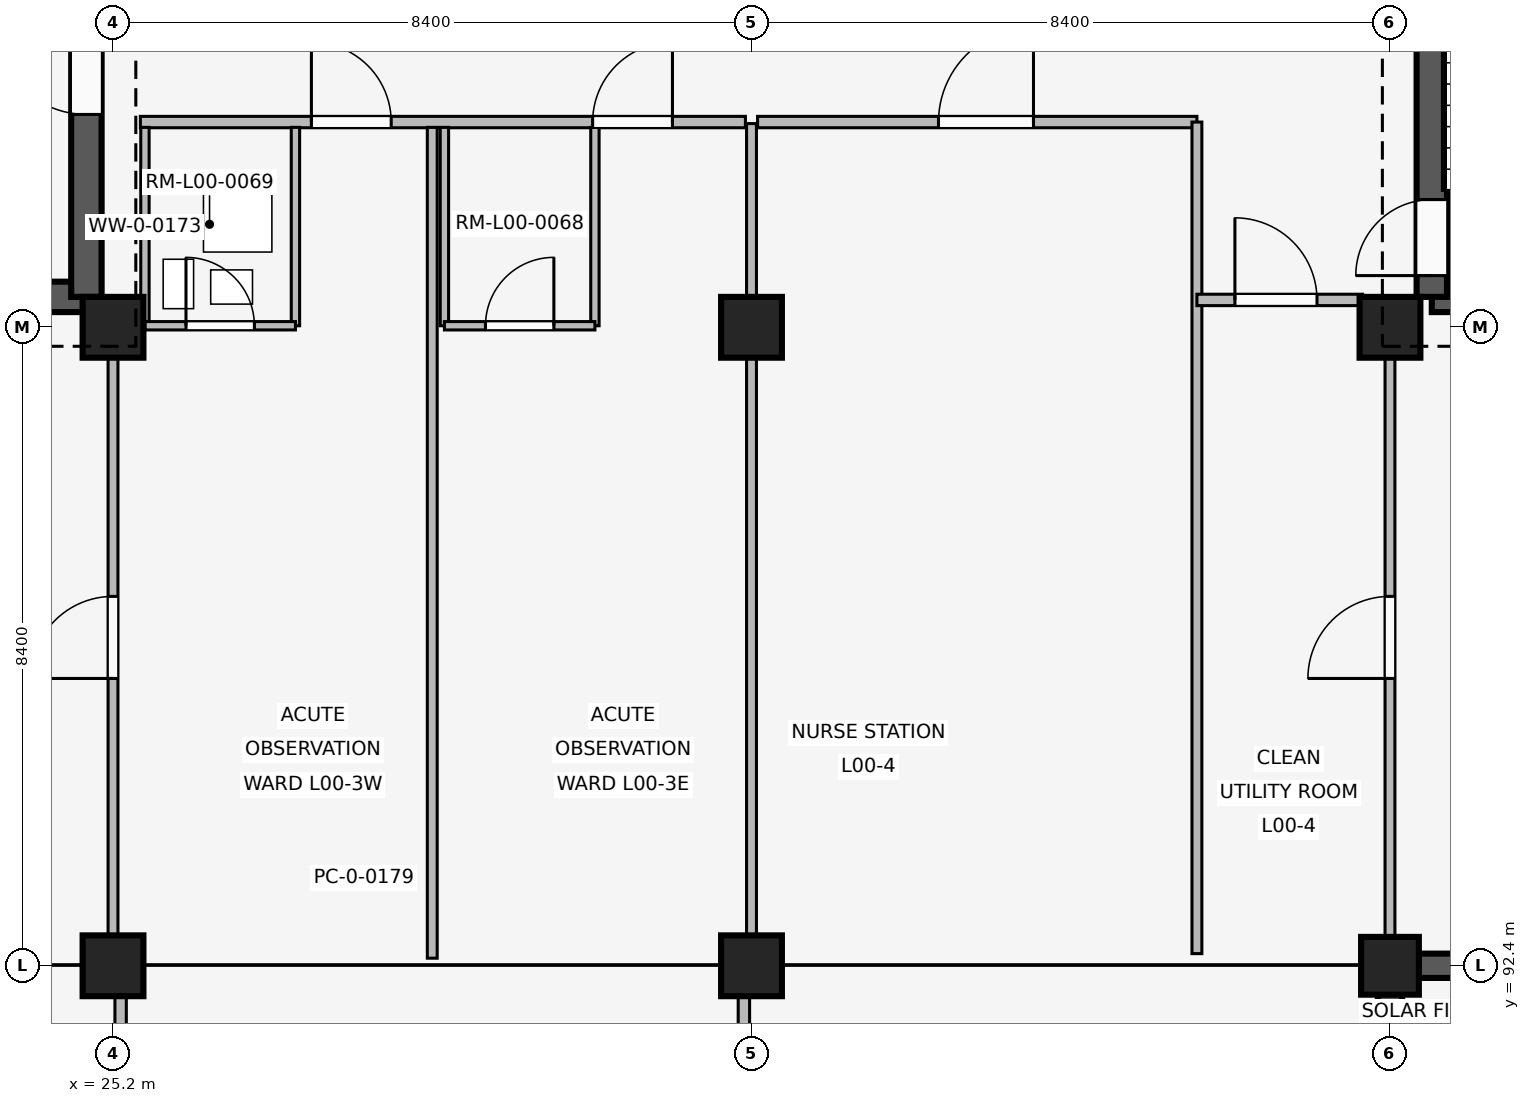
"""IFC4 building model, lengths in metres.
Left out: names, types, materials, properties, quantities, classifications, styles, units other than length and angle.
Written with IfcOpenShell. Run it as: python <this file> out.ifc"""

import sys

from ifc_helpers import new_model, si_unit, direction, frame, frame_2d, origin, origin_2d, place, context, subcontext, project, spatial, rectangle, extrude, element, fill, save


model = new_model("IFC4")
c1 = context("Model", 3, precision=1e-05, world=origin(), true_north=direction((0.0, 1.0)))
c2 = subcontext(c1, "Body", "Model", "MODEL_VIEW")
j1 = project(units=[si_unit("LENGTHUNIT", "METRE"), si_unit("PLANEANGLEUNIT", "RADIAN")], contexts=[c1])
p1 = place(None, origin())
s1 = spatial("IfcSite", under=j1, at=p1, CompositionType="ELEMENT")
p2 = place(p1, origin())
s2 = spatial("IfcBuilding", under=s1, at=p2, CompositionType="ELEMENT")
p3 = place(p2, origin())
s3 = spatial("IfcBuildingStorey", under=s2, at=p3, CompositionType="ELEMENT", Elevation=0.0)
for number, where, z_axis, x_axis in (
    (1, (25.2, 92.4, 0.0), (0.0, 0.0, 1.0), (1.0, 0.0, 0.0)),
    (2, (25.2, 100.8, 0.0), (0.0, 0.0, 1.0), (1.0, 0.0, 0.0)),
    (3, (33.6, 92.4, 0.0), (0.0, 0.0, 1.0), (1.0, 0.0, 0.0)),
    (4, (33.6, 100.8, 0.0), (0.0, 0.0, 1.0), (1.0, 0.0, 0.0)),
):
    element("IfcColumn", number, at=place(p3, frame(where, z_axis=z_axis, x_axis=x_axis)), inside=s3, PredefinedType="COLUMN", context=c2, shape_type="SweptSolid", body=[
        extrude(rectangle(XDim=0.8, YDim=0.8, at=origin_2d()), origin(), (0.0, 0.0, 1.0), 4.8),
    ])
p4 = place(p3, frame((42.0, 92.4, 0.0), z_axis=(0.0, 0.0, 1.0), x_axis=(1.0, 0.0, 0.0)))
e5 = element("IfcColumn", 5, at=p4, inside=s3, PredefinedType="COLUMN", context=c2, shape_type="SweptSolid", body=[
    extrude(rectangle(XDim=0.76, YDim=0.76, at=origin_2d()), origin(), (0.0, 0.0, 1.0), 4.8),
])
p5 = place(p3, frame((42.0, 100.8, 0.0), z_axis=(0.0, 0.0, 1.0), x_axis=(1.0, 0.0, 0.0)))
e6 = element("IfcColumn", 6, at=p5, inside=s3, PredefinedType="COLUMN", context=c2, shape_type="SweptSolid", body=[
    extrude(rectangle(XDim=0.8, YDim=0.8, at=origin_2d()), origin(), (0.0, 0.0, 1.0), 4.8),
])
p6 = place(p3, frame((42.0, 92.025, 0.0), z_axis=(0.0, 0.0, 1.0), x_axis=(0.0, -1.0, 0.0)))
e7 = element("IfcWall", 7, at=p6, inside=s3, PredefinedType="SOLIDWALL", context=c2, shape_type="SweptSolid", body=[
    extrude(rectangle(XDim=7.65, YDim=0.32, at=frame_2d((3.825, 0.0))), origin(), (0.0, 0.0, 1.0), 3.82),
])
p7 = place(p6, frame((0.979, 0.0, 0.85)))
e8 = element("IfcOpeningElement", 8, at=p7, cuts=e7, PredefinedType="OPENING", context=c2, shape_type="SweptSolid", body=[
    extrude(rectangle(XDim=1.56, YDim=1.7, at=frame_2d((0.78, 0.85))), frame((0.0, 0.17, 0.0), z_axis=(0.0, -1.0, 0.0), x_axis=(1.0, 0.0, 0.0)), (0.0, 0.0, 1.0), 0.34),
])
p8 = place(p6, frame((5.111, 0.0, 0.85)))
e9 = element("IfcOpeningElement", 9, at=p8, cuts=e7, PredefinedType="OPENING", context=c2, shape_type="SweptSolid", body=[
    extrude(rectangle(XDim=1.56, YDim=1.7, at=frame_2d((0.78, 0.85))), frame((0.0, 0.17, 0.0), z_axis=(0.0, -1.0, 0.0), x_axis=(1.0, 0.0, 0.0)), (0.0, 0.0, 1.0), 0.34),
])
p9 = place(p3, frame((50.025, 92.4, 0.0), z_axis=(0.0, 0.0, 1.0), x_axis=(-1.0, 0.0, 0.0)))
e10 = element("IfcWall", 10, at=p9, inside=s3, PredefinedType="SOLIDWALL", context=c2, shape_type="SweptSolid", body=[
    extrude(rectangle(XDim=7.65, YDim=0.32, at=frame_2d((3.825, 0.0))), origin(), (0.0, 0.0, 1.0), 3.82),
])
p10 = place(p9, frame((1.04, 0.0, 0.85)))
e11 = element("IfcOpeningElement", 11, at=p10, cuts=e10, PredefinedType="OPENING", context=c2, shape_type="SweptSolid", body=[
    extrude(rectangle(XDim=1.44, YDim=1.62, at=frame_2d((0.72, 0.81))), frame((0.0, 0.17, 0.0), z_axis=(0.0, -1.0, 0.0), x_axis=(1.0, 0.0, 0.0)), (0.0, 0.0, 1.0), 0.34),
])
p11 = place(p9, frame((5.17, 0.0, 0.85)))
e12 = element("IfcOpeningElement", 12, at=p11, cuts=e10, PredefinedType="OPENING", context=c2, shape_type="SweptSolid", body=[
    extrude(rectangle(XDim=1.44, YDim=1.62, at=frame_2d((0.72, 0.81))), frame((0.0, 0.17, 0.0), z_axis=(0.0, -1.0, 0.0), x_axis=(1.0, 0.0, 0.0)), (0.0, 0.0, 1.0), 0.34),
])
p12 = place(p3, frame((42.55, 101.2, 0.0), z_axis=(0.0, 0.0, 1.0), x_axis=(1.0, 0.0, 0.0)))
e13 = element("IfcWall", 13, at=p12, inside=s3, PredefinedType="SHEAR", context=c2, shape_type="SweptSolid", body=[
    extrude(rectangle(XDim=7.5, YDim=0.4, at=frame_2d((3.75, 0.0))), origin(), (0.0, 0.0, 1.0), 4.52),
])
p13 = place(p12, frame((4.85, 0.0, 0.0)))
e14 = element("IfcOpeningElement", 14, at=p13, cuts=e13, PredefinedType="OPENING", context=c2, shape_type="SweptSolid", body=[
    extrude(rectangle(XDim=1.2, YDim=2.2, at=frame_2d((0.6, 1.1))), frame((0.0, 0.21, 0.0), z_axis=(0.0, -1.0, 0.0), x_axis=(1.0, 0.0, 0.0)), (0.0, 0.0, 1.0), 0.42),
])
p14 = place(p3, frame((42.55, 101.2, 0.0), z_axis=(0.0, 0.0, 1.0), x_axis=(0.0, 1.0, 0.0)))
e15 = element("IfcWall", 15, at=p14, inside=s3, PredefinedType="SHEAR", context=c2, shape_type="SweptSolid", body=[
    extrude(rectangle(XDim=7.55, YDim=0.4, at=frame_2d((3.775, 0.0))), origin(), (0.0, 0.0, 1.0), 4.52),
])
p15 = place(p14, frame((0.28, 0.0, 0.0)))
e16 = element("IfcOpeningElement", 16, at=p15, cuts=e15, PredefinedType="OPENING", context=c2, shape_type="SweptSolid", body=[
    extrude(rectangle(XDim=1.0, YDim=2.15, at=frame_2d((0.5, 1.075))), frame((0.0, 0.21, 0.0), z_axis=(0.0, -1.0, 0.0), x_axis=(1.0, 0.0, 0.0)), (0.0, 0.0, 1.0), 0.42),
])
p16 = place(p3, frame((17.35, 101.2, 0.0), z_axis=(0.0, 0.0, 1.0), x_axis=(1.0, 0.0, 0.0)))
e17 = element("IfcWall", 17, at=p16, inside=s3, PredefinedType="SHEAR", context=c2, shape_type="SweptSolid", body=[
    extrude(rectangle(XDim=7.5, YDim=0.4, at=frame_2d((3.75, 0.0))), origin(), (0.0, 0.0, 1.0), 4.52),
])
p17 = place(p16, frame((4.85, 0.0, 0.0)))
e18 = element("IfcOpeningElement", 18, at=p17, cuts=e17, PredefinedType="OPENING", context=c2, shape_type="SweptSolid", body=[
    extrude(rectangle(XDim=1.2, YDim=2.2, at=frame_2d((0.6, 1.1))), frame((0.0, 0.21, 0.0), z_axis=(0.0, -1.0, 0.0), x_axis=(1.0, 0.0, 0.0)), (0.0, 0.0, 1.0), 0.42),
])
p18 = place(p3, frame((24.85, 101.2, 0.0), z_axis=(0.0, 0.0, 1.0), x_axis=(0.0, 1.0, 0.0)))
e19 = element("IfcWall", 19, at=p18, inside=s3, PredefinedType="SHEAR", context=c2, shape_type="SweptSolid", body=[
    extrude(rectangle(XDim=7.55, YDim=0.4, at=frame_2d((3.775, 0.0))), origin(), (0.0, 0.0, 1.0), 4.52),
])
p19 = place(p18, frame((2.4, 0.0, 0.0)))
e20 = element("IfcOpeningElement", 20, at=p19, cuts=e19, PredefinedType="OPENING", context=c2, shape_type="SweptSolid", body=[
    extrude(rectangle(XDim=1.2, YDim=2.2, at=frame_2d((0.6, 1.1))), frame((0.0, 0.21, 0.0), z_axis=(0.0, -1.0, 0.0), x_axis=(1.0, 0.0, 0.0)), (0.0, 0.0, 1.0), 0.42),
])
p20 = place(p3, frame((25.2, 92.54, 0.0), z_axis=(0.0, 0.0, 1.0), x_axis=(0.0, 1.0, 0.0)))
e21 = element("IfcWall", 21, at=p20, inside=s3, PredefinedType="PARTITIONING", context=c2, shape_type="SweptSolid", body=[
    extrude(rectangle(XDim=8.21, YDim=0.13, at=frame_2d((4.105, 0.0))), origin(), (0.0, 0.0, 1.0), 3.8),
])
p21 = place(p20, frame((3.64, 0.0, 0.0)))
e22 = element("IfcOpeningElement", 22, at=p21, cuts=e21, PredefinedType="OPENING", context=c2, shape_type="SweptSolid", body=[
    extrude(rectangle(XDim=1.08, YDim=2.15, at=frame_2d((0.54, 1.075))), frame((0.0, 0.075, 0.0), z_axis=(0.0, -1.0, 0.0), x_axis=(1.0, 0.0, 0.0)), (0.0, 0.0, 1.0), 0.15),
])
p22 = place(p3, frame((25.56, 103.5, 0.0), z_axis=(0.0, 0.0, 1.0), x_axis=(1.0, 0.0, 0.0)))
e23 = element("IfcWall", 23, at=p22, inside=s3, PredefinedType="PARTITIONING", context=c2, shape_type="SweptSolid", body=[
    extrude(rectangle(XDim=7.96, YDim=0.15, at=frame_2d((3.98, 0.0))), origin(), (0.0, 0.0, 1.0), 3.8),
])
p23 = place(p22, frame((2.25, 0.0, 0.0)))
e24 = element("IfcOpeningElement", 24, at=p23, cuts=e23, PredefinedType="OPENING", context=c2, shape_type="SweptSolid", body=[
    extrude(rectangle(XDim=1.05, YDim=2.2, at=frame_2d((0.525, 1.1))), frame((0.0, 0.085, 0.0), z_axis=(0.0, -1.0, 0.0), x_axis=(1.0, 0.0, 0.0)), (0.0, 0.0, 1.0), 0.17),
])
p24 = place(p22, frame((5.95, 0.0, 0.0)))
e25 = element("IfcOpeningElement", 25, at=p24, cuts=e23, PredefinedType="OPENING", context=c2, shape_type="SweptSolid", body=[
    extrude(rectangle(XDim=1.05, YDim=2.2, at=frame_2d((0.525, 1.1))), frame((0.0, 0.085, 0.0), z_axis=(0.0, -1.0, 0.0), x_axis=(1.0, 0.0, 0.0)), (0.0, 0.0, 1.0), 0.17),
])
p25 = place(p3, frame((29.4, 92.5, 0.0), z_axis=(0.0, 0.0, 1.0), x_axis=(0.0, 1.0, 0.0)))
e26 = element("IfcWall", 26, at=p25, inside=s3, PredefinedType="PARTITIONING", context=c2, shape_type="SweptSolid", body=[
    extrude(rectangle(XDim=10.93, YDim=0.13, at=frame_2d((5.465, 0.0))), origin(), (0.0, 0.0, 1.0), 3.8),
])
for number, where, z_axis, x_axis in (
    (27, (25.62, 100.82, 0.0), (0.0, 0.0, 1.0), (0.0, 1.0, 0.0)),
    (28, (27.6, 100.82, 0.0), (0.0, 0.0, 1.0), (0.0, 1.0, 0.0)),
):
    element("IfcWall", number, at=place(p3, frame(where, z_axis=z_axis, x_axis=x_axis)), inside=s3, PredefinedType="PARTITIONING", context=c2, shape_type="SweptSolid", body=[
        extrude(rectangle(XDim=2.61, YDim=0.11, at=frame_2d((1.305, 0.0))), origin(), (0.0, 0.0, 1.0), 3.8),
    ])
p26 = place(p3, frame((25.62, 100.82, 0.0), z_axis=(0.0, 0.0, 1.0), x_axis=(1.0, 0.0, 0.0)))
e29 = element("IfcWall", 29, at=p26, inside=s3, PredefinedType="PARTITIONING", context=c2, shape_type="SweptSolid", body=[
    extrude(rectangle(XDim=1.98, YDim=0.11, at=frame_2d((0.99, 0.0))), origin(), (0.0, 0.0, 1.0), 3.8),
])
p27 = place(p26, frame((0.54, 0.0, 0.0)))
e30 = element("IfcOpeningElement", 30, at=p27, cuts=e29, PredefinedType="OPENING", context=c2, shape_type="SweptSolid", body=[
    extrude(rectangle(XDim=0.9, YDim=2.1, at=frame_2d((0.45, 1.05))), frame((0.0, 0.065, 0.0), z_axis=(0.0, -1.0, 0.0), x_axis=(1.0, 0.0, 0.0)), (0.0, 0.0, 1.0), 0.13),
])
for number, where, z_axis, x_axis in (
    (31, (29.56, 100.82, 0.0), (0.0, 0.0, 1.0), (0.0, 1.0, 0.0)),
    (32, (31.54, 100.82, 0.0), (0.0, 0.0, 1.0), (0.0, 1.0, 0.0)),
):
    element("IfcWall", number, at=place(p3, frame(where, z_axis=z_axis, x_axis=x_axis)), inside=s3, PredefinedType="PARTITIONING", context=c2, shape_type="SweptSolid", body=[
        extrude(rectangle(XDim=2.61, YDim=0.11, at=frame_2d((1.305, 0.0))), origin(), (0.0, 0.0, 1.0), 3.8),
    ])
p28 = place(p3, frame((29.56, 100.82, 0.0), z_axis=(0.0, 0.0, 1.0), x_axis=(1.0, 0.0, 0.0)))
e33 = element("IfcWall", 33, at=p28, inside=s3, PredefinedType="PARTITIONING", context=c2, shape_type="SweptSolid", body=[
    extrude(rectangle(XDim=1.98, YDim=0.11, at=frame_2d((0.99, 0.0))), origin(), (0.0, 0.0, 1.0), 3.8),
])
p29 = place(p28, frame((0.54, 0.0, 0.0)))
e34 = element("IfcOpeningElement", 34, at=p29, cuts=e33, PredefinedType="OPENING", context=c2, shape_type="SweptSolid", body=[
    extrude(rectangle(XDim=0.9, YDim=2.1, at=frame_2d((0.45, 1.05))), frame((0.0, 0.065, 0.0), z_axis=(0.0, -1.0, 0.0), x_axis=(1.0, 0.0, 0.0)), (0.0, 0.0, 1.0), 0.13),
])
p30 = place(p3, frame((28.05, 93.55, 0.0), z_axis=(0.0, 0.0, 1.0), x_axis=(1.0, 0.0, 0.0)))
e35 = element("IfcWall", 35, at=p30, inside=s3, PredefinedType="PLUMBINGWALL", context=c2, shape_type="SweptSolid", body=[
    extrude(rectangle(XDim=0.9, YDim=0.24, at=frame_2d((0.45, 0.0))), origin(), (0.0, 0.0, 1.0), 3.8),
])
p31 = place(p3, frame((33.6, 92.54, 0.0), z_axis=(0.0, 0.0, 1.0), x_axis=(0.0, 1.0, 0.0)))
e36 = element("IfcWall", 36, at=p31, inside=s3, PredefinedType="PARTITIONING", context=c2, shape_type="SweptSolid", body=[
    extrude(rectangle(XDim=10.94, YDim=0.13, at=frame_2d((5.47, 0.0))), origin(), (0.0, 0.0, 1.0), 3.8),
])
p32 = place(p3, frame((33.68, 103.5, 0.0), z_axis=(0.0, 0.0, 1.0), x_axis=(1.0, 0.0, 0.0)))
e37 = element("IfcWall", 37, at=p32, inside=s3, PredefinedType="PARTITIONING", context=c2, shape_type="SweptSolid", body=[
    extrude(rectangle(XDim=5.78, YDim=0.15, at=frame_2d((2.89, 0.0))), origin(), (0.0, 0.0, 1.0), 3.8),
])
p33 = place(p32, frame((2.38, 0.0, 0.0)))
e38 = element("IfcOpeningElement", 38, at=p33, cuts=e37, PredefinedType="OPENING", context=c2, shape_type="SweptSolid", body=[
    extrude(rectangle(XDim=1.25, YDim=2.2, at=frame_2d((0.625, 1.1))), frame((0.0, 0.085, 0.0), z_axis=(0.0, -1.0, 0.0), x_axis=(1.0, 0.0, 0.0)), (0.0, 0.0, 1.0), 0.17),
])
p34 = place(p3, frame((39.46, 92.56, 0.0), z_axis=(0.0, 0.0, 1.0), x_axis=(0.0, 1.0, 0.0)))
e39 = element("IfcWall", 39, at=p34, inside=s3, PredefinedType="PARTITIONING", context=c2, shape_type="SweptSolid", body=[
    extrude(rectangle(XDim=10.94, YDim=0.13, at=frame_2d((5.47, 0.0))), origin(), (0.0, 0.0, 1.0), 3.8),
])
p35 = place(p3, frame((39.46, 101.16, 0.0), z_axis=(0.0, 0.0, 1.0), x_axis=(1.0, 0.0, 0.0)))
e40 = element("IfcWall", 40, at=p35, inside=s3, PredefinedType="PARTITIONING", context=c2, shape_type="SweptSolid", body=[
    extrude(rectangle(XDim=2.18, YDim=0.15, at=frame_2d((1.09, 0.0))), origin(), (0.0, 0.0, 1.0), 3.8),
])
p36 = place(p35, frame((0.5, 0.0, 0.0)))
e41 = element("IfcOpeningElement", 41, at=p36, cuts=e40, PredefinedType="OPENING", context=c2, shape_type="SweptSolid", body=[
    extrude(rectangle(XDim=1.08, YDim=2.15, at=frame_2d((0.54, 1.075))), frame((0.0, 0.085, 0.0), z_axis=(0.0, -1.0, 0.0), x_axis=(1.0, 0.0, 0.0)), (0.0, 0.0, 1.0), 0.17),
])
p37 = place(p3, frame((42.0, 92.54, 0.0), z_axis=(0.0, 0.0, 1.0), x_axis=(0.0, 1.0, 0.0)))
e42 = element("IfcWall", 42, at=p37, inside=s3, PredefinedType="PARTITIONING", context=c2, shape_type="SweptSolid", body=[
    extrude(rectangle(XDim=8.21, YDim=0.13, at=frame_2d((4.105, 0.0))), origin(), (0.0, 0.0, 1.0), 3.8),
])
p38 = place(p37, frame((3.64, 0.0, 0.0)))
e43 = element("IfcOpeningElement", 43, at=p38, cuts=e42, PredefinedType="OPENING", context=c2, shape_type="SweptSolid", body=[
    extrude(rectangle(XDim=1.08, YDim=2.15, at=frame_2d((0.54, 1.075))), frame((0.0, 0.075, 0.0), z_axis=(0.0, -1.0, 0.0), x_axis=(1.0, 0.0, 0.0)), (0.0, 0.0, 1.0), 0.15),
])
p39 = place(p3, frame((25.3, 76.0, 0.0), z_axis=(0.0, 0.0, 1.0), x_axis=(0.0, 1.0, 0.0)))
e44 = element("IfcWall", 44, at=p39, inside=s3, PredefinedType="PARTITIONING", context=c2, shape_type="SweptSolid", body=[
    extrude(rectangle(XDim=16.0, YDim=0.15, at=frame_2d((8.0, 0.0))), origin(), (0.0, 0.0, 1.0), 3.8),
])
p40 = place(p39, frame((3.4, 0.0, 0.0)))
e45 = element("IfcOpeningElement", 45, at=p40, cuts=e44, PredefinedType="OPENING", context=c2, shape_type="SweptSolid", body=[
    extrude(rectangle(XDim=1.08, YDim=2.15, at=frame_2d((0.54, 1.075))), frame((0.0, 0.085, 0.0), z_axis=(0.0, -1.0, 0.0), x_axis=(1.0, 0.0, 0.0)), (0.0, 0.0, 1.0), 0.17),
])
p41 = place(p3, frame((33.5, 59.2, 0.0), z_axis=(0.0, 0.0, 1.0), x_axis=(0.0, 1.0, 0.0)))
e46 = element("IfcWall", 46, at=p41, inside=s3, PredefinedType="PARTITIONING", context=c2, shape_type="SweptSolid", body=[
    extrude(rectangle(XDim=32.8, YDim=0.15, at=frame_2d((16.4, 0.0))), origin(), (0.0, 0.0, 1.0), 3.8),
])
p42 = place(p41, frame((3.4, 0.0, 0.0)))
e47 = element("IfcOpeningElement", 47, at=p42, cuts=e46, PredefinedType="OPENING", context=c2, shape_type="SweptSolid", body=[
    extrude(rectangle(XDim=1.55, YDim=2.3, at=frame_2d((0.775, 1.15))), frame((0.0, 0.085, 0.0), z_axis=(0.0, -1.0, 0.0), x_axis=(1.0, 0.0, 0.0)), (0.0, 0.0, 1.0), 0.17),
])
p43 = place(p15, origin())
e48 = element("IfcDoor", 48, at=p43, inside=s3, OperationType="SINGLE_SWING_LEFT", PredefinedType="DOOR", context=c2, shape_type="SweptSolid", body=[
    extrude(rectangle(XDim=1.0, YDim=2.15, at=frame_2d((0.5, 1.075))), frame((0.0, 0.025, 0.0), z_axis=(0.0, -1.0, 0.0), x_axis=(1.0, 0.0, 0.0)), (0.0, 0.0, 1.0), 0.05),
])
fill(e16, e48)
p44 = place(p19, origin())
e49 = element("IfcDoor", 49, at=p44, inside=s3, OperationType="SINGLE_SWING_RIGHT", PredefinedType="DOOR", context=c2, shape_type="SweptSolid", body=[
    extrude(rectangle(XDim=1.2, YDim=2.2, at=frame_2d((0.6, 1.1))), frame((0.0, 0.025, 0.0), z_axis=(0.0, -1.0, 0.0), x_axis=(1.0, 0.0, 0.0)), (0.0, 0.0, 1.0), 0.05),
])
fill(e20, e49)
p45 = place(p21, origin())
e50 = element("IfcDoor", 50, at=p45, inside=s3, OperationType="SINGLE_SWING_LEFT", PredefinedType="DOOR", context=c2, shape_type="SweptSolid", body=[
    extrude(rectangle(XDim=1.08, YDim=2.15, at=frame_2d((0.54, 1.075))), frame((0.0, 0.025, 0.0), z_axis=(0.0, -1.0, 0.0), x_axis=(1.0, 0.0, 0.0)), (0.0, 0.0, 1.0), 0.05),
])
fill(e22, e50)
p46 = place(p23, origin())
e51 = element("IfcDoor", 51, at=p46, inside=s3, OperationType="SINGLE_SWING_LEFT", PredefinedType="DOOR", context=c2, shape_type="SweptSolid", body=[
    extrude(rectangle(XDim=1.05, YDim=2.2, at=frame_2d((0.525, 1.1))), frame((0.0, 0.025, 0.0), z_axis=(0.0, -1.0, 0.0), x_axis=(1.0, 0.0, 0.0)), (0.0, 0.0, 1.0), 0.05),
])
fill(e24, e51)
p47 = place(p24, origin())
e52 = element("IfcDoor", 52, at=p47, inside=s3, OperationType="SINGLE_SWING_RIGHT", PredefinedType="DOOR", context=c2, shape_type="SweptSolid", body=[
    extrude(rectangle(XDim=1.05, YDim=2.2, at=frame_2d((0.525, 1.1))), frame((0.0, 0.025, 0.0), z_axis=(0.0, -1.0, 0.0), x_axis=(1.0, 0.0, 0.0)), (0.0, 0.0, 1.0), 0.05),
])
fill(e25, e52)
p48 = place(p27, origin())
e53 = element("IfcDoor", 53, at=p48, inside=s3, OperationType="SINGLE_SWING_LEFT", PredefinedType="DOOR", context=c2, shape_type="SweptSolid", body=[
    extrude(rectangle(XDim=0.9, YDim=2.1, at=frame_2d((0.45, 1.05))), frame((0.0, 0.025, 0.0), z_axis=(0.0, -1.0, 0.0), x_axis=(1.0, 0.0, 0.0)), (0.0, 0.0, 1.0), 0.05),
])
fill(e30, e53)
p49 = place(p29, origin())
e54 = element("IfcDoor", 54, at=p49, inside=s3, OperationType="SINGLE_SWING_RIGHT", PredefinedType="DOOR", context=c2, shape_type="SweptSolid", body=[
    extrude(rectangle(XDim=0.9, YDim=2.1, at=frame_2d((0.45, 1.05))), frame((0.0, 0.025, 0.0), z_axis=(0.0, -1.0, 0.0), x_axis=(1.0, 0.0, 0.0)), (0.0, 0.0, 1.0), 0.05),
])
fill(e34, e54)
p50 = place(p33, origin())
e55 = element("IfcDoor", 55, at=p50, inside=s3, OperationType="SINGLE_SWING_RIGHT", PredefinedType="DOOR", context=c2, shape_type="SweptSolid", body=[
    extrude(rectangle(XDim=1.25, YDim=2.2, at=frame_2d((0.625, 1.1))), frame((0.0, 0.025, 0.0), z_axis=(0.0, -1.0, 0.0), x_axis=(1.0, 0.0, 0.0)), (0.0, 0.0, 1.0), 0.05),
])
fill(e38, e55)
p51 = place(p36, origin())
e56 = element("IfcDoor", 56, at=p51, inside=s3, OperationType="SINGLE_SWING_LEFT", PredefinedType="DOOR", context=c2, shape_type="SweptSolid", body=[
    extrude(rectangle(XDim=1.08, YDim=2.15, at=frame_2d((0.54, 1.075))), frame((0.0, 0.025, 0.0), z_axis=(0.0, -1.0, 0.0), x_axis=(1.0, 0.0, 0.0)), (0.0, 0.0, 1.0), 0.05),
])
fill(e41, e56)
p52 = place(p38, origin())
e57 = element("IfcDoor", 57, at=p52, inside=s3, OperationType="SINGLE_SWING_LEFT", PredefinedType="DOOR", context=c2, shape_type="SweptSolid", body=[
    extrude(rectangle(XDim=1.08, YDim=2.15, at=frame_2d((0.54, 1.075))), frame((0.0, 0.025, 0.0), z_axis=(0.0, -1.0, 0.0), x_axis=(1.0, 0.0, 0.0)), (0.0, 0.0, 1.0), 0.05),
])
fill(e43, e57)
save(model, sys.argv[1])
